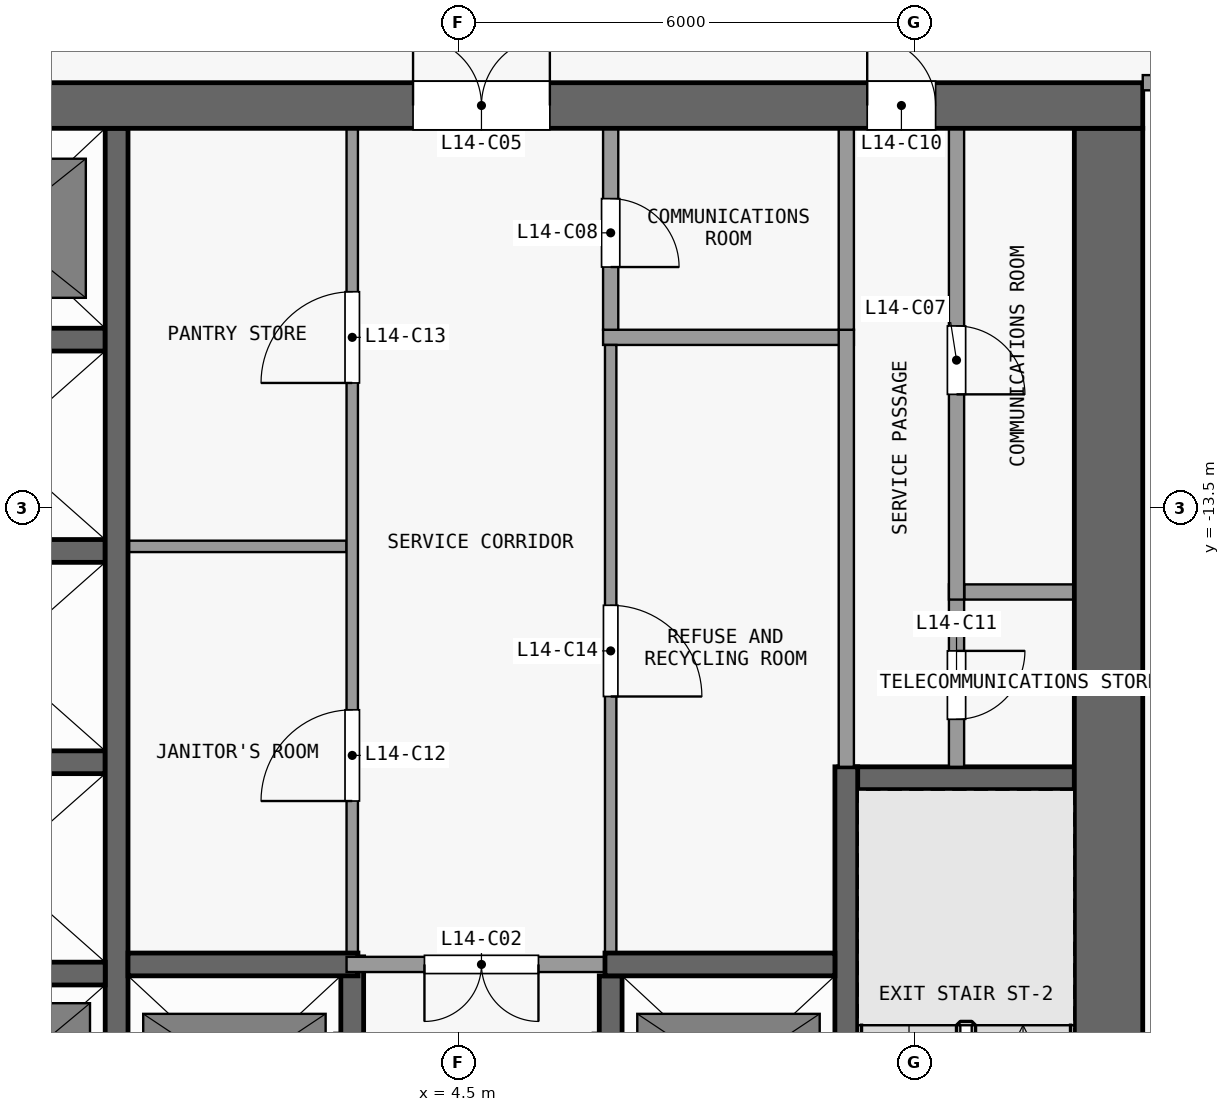
"""IFC4 building model, lengths in metres.
Left out: names, types, materials, properties, quantities, classifications, styles, units other than length and angle.
Written with IfcOpenShell. Run it as: python <this file> out.ifc"""

import sys

from ifc_helpers import new_model, si_unit, direction, frame, frame_2d, origin, place, context, subcontext, project, spatial, rectangle, extrude, element, fill, save


model = new_model("IFC4")
c1 = context("Model", 3, precision=1e-05, world=origin(), true_north=direction((0.0, 1.0)))
c2 = subcontext(c1, "Body", "Model", "MODEL_VIEW")
j1 = project(units=[si_unit("LENGTHUNIT", "METRE"), si_unit("PLANEANGLEUNIT", "RADIAN")], contexts=[c1])
p1 = place(None, origin())
s1 = spatial("IfcSite", under=j1, at=p1, CompositionType="ELEMENT")
p2 = place(p1, origin())
s2 = spatial("IfcBuilding", under=s1, at=p2, CompositionType="ELEMENT")
p3 = place(p2, frame((0.0, 0.0, 61.3)))
s3 = spatial("IfcBuildingStorey", under=s2, at=p3, CompositionType="ELEMENT", Elevation=61.3)
p4 = place(p3, frame((-13.5, -8.2, 0.0), z_axis=(0.0, 0.0, 1.0), x_axis=(1.0, 0.0, 0.0)))
e1 = element("IfcWall", 1, at=p4, inside=s3, PredefinedType="SHEAR", context=c2, shape_type="SweptSolid", body=[
    extrude(rectangle(XDim=27.0, YDim=0.6, at=frame_2d((13.5, 0.0))), origin(), (0.0, 0.0, 1.0), 3.3),
])
p5 = place(p4, frame((7.8, 0.0, 0.0)))
e2 = element("IfcOpeningElement", 2, at=p5, cuts=e1, PredefinedType="OPENING", context=c2, shape_type="SweptSolid", body=[
    extrude(rectangle(XDim=1.8, YDim=2.1, at=frame_2d((0.9, 1.05))), frame((0.0, 0.31, 0.0), z_axis=(0.0, -1.0, 0.0), x_axis=(1.0, 0.0, 0.0)), (0.0, 0.0, 1.0), 0.62),
])
p6 = place(p4, frame((17.4, 0.0, 0.0)))
e3 = element("IfcOpeningElement", 3, at=p6, cuts=e1, PredefinedType="OPENING", context=c2, shape_type="SweptSolid", body=[
    extrude(rectangle(XDim=1.8, YDim=2.1, at=frame_2d((0.9, 1.05))), frame((0.0, 0.31, 0.0), z_axis=(0.0, -1.0, 0.0), x_axis=(1.0, 0.0, 0.0)), (0.0, 0.0, 1.0), 0.62),
])
p7 = place(p4, frame((1.725, 0.0, 0.0)))
e4 = element("IfcOpeningElement", 4, at=p7, cuts=e1, PredefinedType="OPENING", context=c2, shape_type="SweptSolid", body=[
    extrude(rectangle(XDim=1.2, YDim=2.1, at=frame_2d((0.6, 1.05))), frame((0.0, 0.31, 0.0), z_axis=(0.0, -1.0, 0.0), x_axis=(1.0, 0.0, 0.0)), (0.0, 0.0, 1.0), 0.62),
])
p8 = place(p4, frame((23.375, 0.0, 0.0)))
e5 = element("IfcOpeningElement", 5, at=p8, cuts=e1, PredefinedType="OPENING", context=c2, shape_type="SweptSolid", body=[
    extrude(rectangle(XDim=0.9, YDim=2.1, at=frame_2d((0.45, 1.05))), frame((0.0, 0.31, 0.0), z_axis=(0.0, -1.0, 0.0), x_axis=(1.0, 0.0, 0.0)), (0.0, 0.0, 1.0), 0.62),
])
p9 = place(p3, frame((13.05, -24.6, 0.0), z_axis=(0.0, 0.0, 1.0), x_axis=(0.0, 1.0, 0.0)))
e6 = element("IfcWall", 6, at=p9, inside=s3, PredefinedType="SHEAR", context=c2, shape_type="SweptSolid", body=[
    extrude(rectangle(XDim=16.1, YDim=0.9, at=frame_2d((8.05, 0.0))), origin(), (0.0, 0.0, 1.0), 3.3),
])
p10 = place(p3, frame((-2.95, -19.62, 0.0), z_axis=(0.0, 0.0, 1.0), x_axis=(1.0, 0.0, 0.0)))
e7 = element("IfcWall", 7, at=p10, inside=s3, PredefinedType="SHEAR", context=c2, shape_type="SweptSolid", body=[
    extrude(rectangle(XDim=2.8, YDim=0.3, at=frame_2d((1.4, 0.0))), origin(), (0.0, 0.0, 1.0), 3.3),
])
p11 = place(p3, frame((0.15, -19.5, 0.0), z_axis=(0.0, 0.0, 1.0), x_axis=(1.0, 0.0, 0.0)))
e8 = element("IfcWall", 8, at=p11, inside=s3, PredefinedType="SHEAR", context=c2, shape_type="SweptSolid", body=[
    extrude(rectangle(XDim=3.025, YDim=0.3, at=frame_2d((1.513, 0.0))), origin(), (0.0, 0.0, 1.0), 3.3),
])
p12 = place(p3, frame((6.575, -19.5, 0.0), z_axis=(0.0, 0.0, 1.0), x_axis=(-1.0, 0.0, 0.0)))
e9 = element("IfcWall", 9, at=p12, inside=s3, PredefinedType="PARTITIONING", context=c2, shape_type="SweptSolid", body=[
    extrude(rectangle(XDim=3.55, YDim=0.2, at=frame_2d((1.775, 0.0))), origin(), (0.0, 0.0, 1.0), 3.3),
])
p13 = place(p12, frame((1.025, 0.0, 0.0)))
e10 = element("IfcOpeningElement", 10, at=p13, cuts=e9, PredefinedType="OPENING", context=c2, shape_type="SweptSolid", body=[
    extrude(rectangle(XDim=1.5, YDim=2.1, at=frame_2d((0.75, 1.05))), frame((0.0, 0.11, 0.0), z_axis=(0.0, -1.0, 0.0), x_axis=(1.0, 0.0, 0.0)), (0.0, 0.0, 1.0), 0.22),
])
p14 = place(p3, frame((6.425, -19.5, 0.0), z_axis=(0.0, 0.0, 1.0), x_axis=(1.0, 0.0, 0.0)))
e11 = element("IfcWall", 11, at=p14, inside=s3, PredefinedType="SHEAR", context=c2, shape_type="SweptSolid", body=[
    extrude(rectangle(XDim=3.025, YDim=0.3, at=frame_2d((1.512, 0.0))), origin(), (0.0, 0.0, 1.0), 3.3),
])
p15 = place(p3, frame((9.5, -17.05, 0.0), z_axis=(0.0, 0.0, 1.0), x_axis=(1.0, 0.0, 0.0)))
e12 = element("IfcWall", 12, at=p15, inside=s3, PredefinedType="SHEAR", context=c2, shape_type="SweptSolid", body=[
    extrude(rectangle(XDim=3.1, YDim=0.3, at=frame_2d((1.55, 0.0))), origin(), (0.0, 0.0, 1.0), 3.3),
])
p16 = place(p3, frame((-2.95, -16.84, 0.0), z_axis=(0.0, 0.0, 1.0), x_axis=(1.0, 0.0, 0.0)))
e13 = element("IfcWall", 13, at=p16, inside=s3, PredefinedType="SHEAR", context=c2, shape_type="SweptSolid", body=[
    extrude(rectangle(XDim=2.8, YDim=0.3, at=frame_2d((1.4, 0.0))), origin(), (0.0, 0.0, 1.0), 3.3),
])
p17 = place(p3, frame((11.15, -14.6, 0.0), z_axis=(0.0, 0.0, 1.0), x_axis=(1.0, 0.0, 0.0)))
e14 = element("IfcWall", 14, at=p17, inside=s3, PredefinedType="PARTITIONING", context=c2, shape_type="SweptSolid", body=[
    extrude(rectangle(XDim=1.45, YDim=0.2, at=frame_2d((0.725, 0.0))), origin(), (0.0, 0.0, 1.0), 3.3),
])
p18 = place(p3, frame((-2.95, -14.06, 0.0), z_axis=(0.0, 0.0, 1.0), x_axis=(1.0, 0.0, 0.0)))
e15 = element("IfcWall", 15, at=p18, inside=s3, PredefinedType="SHEAR", context=c2, shape_type="SweptSolid", body=[
    extrude(rectangle(XDim=2.8, YDim=0.3, at=frame_2d((1.4, 0.0))), origin(), (0.0, 0.0, 1.0), 3.3),
])
p19 = place(p3, frame((0.15, -14.0, 0.0), z_axis=(0.0, 0.0, 1.0), x_axis=(1.0, 0.0, 0.0)))
e16 = element("IfcWall", 16, at=p19, inside=s3, PredefinedType="PARTITIONING", context=c2, shape_type="SweptSolid", body=[
    extrude(rectangle(XDim=2.875, YDim=0.15, at=frame_2d((1.438, 0.0))), origin(), (0.0, 0.0, 1.0), 3.3),
])
p20 = place(p3, frame((-2.95, -11.28, 0.0), z_axis=(0.0, 0.0, 1.0), x_axis=(1.0, 0.0, 0.0)))
e17 = element("IfcWall", 17, at=p20, inside=s3, PredefinedType="SHEAR", context=c2, shape_type="SweptSolid", body=[
    extrude(rectangle(XDim=2.8, YDim=0.3, at=frame_2d((1.4, 0.0))), origin(), (0.0, 0.0, 1.0), 3.3),
])
p21 = place(p3, frame((6.4, -11.25, 0.0), z_axis=(0.0, 0.0, 1.0), x_axis=(1.0, 0.0, 0.0)))
e18 = element("IfcWall", 18, at=p21, inside=s3, PredefinedType="PARTITIONING", context=c2, shape_type="SweptSolid", body=[
    extrude(rectangle(XDim=3.3, YDim=0.2, at=frame_2d((1.65, 0.0))), origin(), (0.0, 0.0, 1.0), 3.3),
])
p22 = place(p3, frame((0.0, -22.25, 0.0), z_axis=(0.0, 0.0, 1.0), x_axis=(0.0, 1.0, 0.0)))
e19 = element("IfcWall", 19, at=p22, inside=s3, PredefinedType="SHEAR", context=c2, shape_type="SweptSolid", body=[
    extrude(rectangle(XDim=13.75, YDim=0.3, at=frame_2d((6.875, 0.0))), origin(), (0.0, 0.0, 1.0), 3.3),
])
p23 = place(p3, frame((3.1, -22.25, 0.0), z_axis=(0.0, 0.0, 1.0), x_axis=(0.0, 1.0, 0.0)))
e20 = element("IfcWall", 20, at=p23, inside=s3, PredefinedType="SHEAR", context=c2, shape_type="SweptSolid", body=[
    extrude(rectangle(XDim=2.85, YDim=0.3, at=frame_2d((1.425, 0.0))), origin(), (0.0, 0.0, 1.0), 3.3),
])
p24 = place(p23, frame((0.75, 0.0, 0.0)))
e21 = element("IfcOpeningElement", 21, at=p24, cuts=e20, PredefinedType="OPENING", context=c2, shape_type="SweptSolid", body=[
    extrude(rectangle(XDim=1.1, YDim=2.1, at=frame_2d((0.55, 1.05))), frame((0.0, 0.16, 0.0), z_axis=(0.0, -1.0, 0.0), x_axis=(1.0, 0.0, 0.0)), (0.0, 0.0, 1.0), 0.32),
])
p25 = place(p3, frame((3.1, -19.4, 0.0), z_axis=(0.0, 0.0, 1.0), x_axis=(0.0, 1.0, 0.0)))
e22 = element("IfcWall", 22, at=p25, inside=s3, PredefinedType="PARTITIONING", context=c2, shape_type="SweptSolid", body=[
    extrude(rectangle(XDim=10.9, YDim=0.15, at=frame_2d((5.45, 0.0))), origin(), (0.0, 0.0, 1.0), 3.3),
])
p26 = place(p25, frame((2.05, 0.0, 0.0)))
e23 = element("IfcOpeningElement", 23, at=p26, cuts=e22, PredefinedType="OPENING", context=c2, shape_type="SweptSolid", body=[
    extrude(rectangle(XDim=1.2, YDim=2.1, at=frame_2d((0.6, 1.05))), frame((0.0, 0.085, 0.0), z_axis=(0.0, -1.0, 0.0), x_axis=(1.0, 0.0, 0.0)), (0.0, 0.0, 1.0), 0.17),
])
p27 = place(p25, frame((7.55, 0.0, 0.0)))
e24 = element("IfcOpeningElement", 24, at=p27, cuts=e22, PredefinedType="OPENING", context=c2, shape_type="SweptSolid", body=[
    extrude(rectangle(XDim=1.2, YDim=2.1, at=frame_2d((0.6, 1.05))), frame((0.0, 0.085, 0.0), z_axis=(0.0, -1.0, 0.0), x_axis=(1.0, 0.0, 0.0)), (0.0, 0.0, 1.0), 0.17),
])
p28 = place(p3, frame((6.5, -22.25, 0.0), z_axis=(0.0, 0.0, 1.0), x_axis=(0.0, 1.0, 0.0)))
e25 = element("IfcWall", 25, at=p28, inside=s3, PredefinedType="SHEAR", context=c2, shape_type="SweptSolid", body=[
    extrude(rectangle(XDim=2.6, YDim=0.3, at=frame_2d((1.3, 0.0))), origin(), (0.0, 0.0, 1.0), 3.3),
])
p29 = place(p28, frame((0.75, 0.0, 0.0)))
e26 = element("IfcOpeningElement", 26, at=p29, cuts=e25, PredefinedType="OPENING", context=c2, shape_type="SweptSolid", body=[
    extrude(rectangle(XDim=1.1, YDim=2.1, at=frame_2d((0.55, 1.05))), frame((0.0, 0.16, 0.0), z_axis=(0.0, -1.0, 0.0), x_axis=(1.0, 0.0, 0.0)), (0.0, 0.0, 1.0), 0.32),
])
p30 = place(p3, frame((6.5, -11.35, 0.0), z_axis=(0.0, 0.0, 1.0), x_axis=(0.0, -1.0, 0.0)))
e27 = element("IfcWall", 27, at=p30, inside=s3, PredefinedType="PARTITIONING", context=c2, shape_type="SweptSolid", body=[
    extrude(rectangle(XDim=8.0, YDim=0.15, at=frame_2d((4.0, 0.0))), origin(), (0.0, 0.0, 1.0), 3.3),
])
p31 = place(p30, frame((3.425, 0.0, 0.0)))
e28 = element("IfcOpeningElement", 28, at=p31, cuts=e27, PredefinedType="OPENING", context=c2, shape_type="SweptSolid", body=[
    extrude(rectangle(XDim=1.2, YDim=2.1, at=frame_2d((0.6, 1.05))), frame((0.0, 0.085, 0.0), z_axis=(0.0, -1.0, 0.0), x_axis=(1.0, 0.0, 0.0)), (0.0, 0.0, 1.0), 0.17),
])
p32 = place(p3, frame((6.5, -8.5, 0.0), z_axis=(0.0, 0.0, 1.0), x_axis=(0.0, -1.0, 0.0)))
e29 = element("IfcWall", 29, at=p32, inside=s3, PredefinedType="PARTITIONING", context=c2, shape_type="SweptSolid", body=[
    extrude(rectangle(XDim=2.65, YDim=0.2, at=frame_2d((1.325, 0.0))), origin(), (0.0, 0.0, 1.0), 3.3),
])
p33 = place(p32, frame((0.925, 0.0, 0.0)))
e30 = element("IfcOpeningElement", 30, at=p33, cuts=e29, PredefinedType="OPENING", context=c2, shape_type="SweptSolid", body=[
    extrude(rectangle(XDim=0.9, YDim=2.1, at=frame_2d((0.45, 1.05))), frame((0.0, 0.11, 0.0), z_axis=(0.0, -1.0, 0.0), x_axis=(1.0, 0.0, 0.0)), (0.0, 0.0, 1.0), 0.22),
])
p34 = place(p3, frame((9.6, -16.9, 0.0), z_axis=(0.0, 0.0, 1.0), x_axis=(0.0, -1.0, 0.0)))
e31 = element("IfcWall", 31, at=p34, inside=s3, PredefinedType="SHEAR", context=c2, shape_type="SweptSolid", body=[
    extrude(rectangle(XDim=7.7, YDim=0.3, at=frame_2d((3.85, 0.0))), origin(), (0.0, 0.0, 1.0), 3.3),
])
p35 = place(p34, frame((6.5, 0.0, 0.0)))
e32 = element("IfcOpeningElement", 32, at=p35, cuts=e31, PredefinedType="OPENING", context=c2, shape_type="SweptSolid", body=[
    extrude(rectangle(XDim=1.1, YDim=2.1, at=frame_2d((0.55, 1.05))), frame((0.0, 0.16, 0.0), z_axis=(0.0, -1.0, 0.0), x_axis=(1.0, 0.0, 0.0)), (0.0, 0.0, 1.0), 0.32),
])
p36 = place(p3, frame((9.6, -16.9, 0.0), z_axis=(0.0, 0.0, 1.0), x_axis=(0.0, 1.0, 0.0)))
e33 = element("IfcWall", 33, at=p36, inside=s3, PredefinedType="PARTITIONING", context=c2, shape_type="SweptSolid", body=[
    extrude(rectangle(XDim=5.75, YDim=0.2, at=frame_2d((2.875, 0.0))), origin(), (0.0, 0.0, 1.0), 3.3),
])
p37 = place(p3, frame((9.6, -11.15, 0.0), z_axis=(0.0, 0.0, 1.0), x_axis=(0.0, 1.0, 0.0)))
e34 = element("IfcWall", 34, at=p37, inside=s3, PredefinedType="PARTITIONING", context=c2, shape_type="SweptSolid", body=[
    extrude(rectangle(XDim=2.65, YDim=0.2, at=frame_2d((1.325, 0.0))), origin(), (0.0, 0.0, 1.0), 3.3),
])
p38 = place(p3, frame((11.05, -14.5, 0.0), z_axis=(0.0, 0.0, 1.0), x_axis=(0.0, -1.0, 0.0)))
e35 = element("IfcWall", 35, at=p38, inside=s3, PredefinedType="PARTITIONING", context=c2, shape_type="SweptSolid", body=[
    extrude(rectangle(XDim=2.4, YDim=0.2, at=frame_2d((1.2, 0.0))), origin(), (0.0, 0.0, 1.0), 3.3),
])
p39 = place(p38, frame((0.875, 0.0, 0.0)))
e36 = element("IfcOpeningElement", 36, at=p39, cuts=e35, PredefinedType="OPENING", context=c2, shape_type="SweptSolid", body=[
    extrude(rectangle(XDim=0.9, YDim=2.1, at=frame_2d((0.45, 1.05))), frame((0.0, 0.11, 0.0), z_axis=(0.0, -1.0, 0.0), x_axis=(1.0, 0.0, 0.0)), (0.0, 0.0, 1.0), 0.22),
])
p40 = place(p3, frame((11.05, -8.5, 0.0), z_axis=(0.0, 0.0, 1.0), x_axis=(0.0, -1.0, 0.0)))
e37 = element("IfcWall", 37, at=p40, inside=s3, PredefinedType="PARTITIONING", context=c2, shape_type="SweptSolid", body=[
    extrude(rectangle(XDim=6.2, YDim=0.2, at=frame_2d((3.1, 0.0))), origin(), (0.0, 0.0, 1.0), 3.3),
])
p41 = place(p40, frame((2.6, 0.0, 0.0)))
e38 = element("IfcOpeningElement", 38, at=p41, cuts=e37, PredefinedType="OPENING", context=c2, shape_type="SweptSolid", body=[
    extrude(rectangle(XDim=0.9, YDim=2.1, at=frame_2d((0.45, 1.05))), frame((0.0, 0.11, 0.0), z_axis=(0.0, -1.0, 0.0), x_axis=(1.0, 0.0, 0.0)), (0.0, 0.0, 1.0), 0.22),
])
p42 = place(p3, frame((13.5, -7.9, 0.0), z_axis=(0.0, 0.0, 1.0), x_axis=(1.0, 0.0, 0.0)))
e39 = element("IfcWall", 39, at=p42, inside=s3, PredefinedType="PARTITIONING", context=c2, shape_type="SweptSolid", body=[
    extrude(rectangle(XDim=11.75, YDim=0.2, at=frame_2d((5.875, 0.0))), origin(), (0.0, 0.0, 1.0), 3.3),
])
p43 = place(p42, frame((1.0, 0.0, 0.0)))
e40 = element("IfcOpeningElement", 40, at=p43, cuts=e39, PredefinedType="OPENING", context=c2, shape_type="SweptSolid", body=[
    extrude(rectangle(XDim=1.0, YDim=2.1, at=frame_2d((0.5, 1.05))), frame((0.0, 0.11, 0.0), z_axis=(0.0, -1.0, 0.0), x_axis=(1.0, 0.0, 0.0)), (0.0, 0.0, 1.0), 0.22),
])
p44 = place(p13, origin())
e41 = element("IfcDoor", 41, at=p44, inside=s3, OperationType="DOUBLE_DOOR_SINGLE_SWING", PredefinedType="DOOR", context=c2, shape_type="SweptSolid", body=[
    extrude(rectangle(XDim=1.5, YDim=2.1, at=frame_2d((0.75, 1.05))), frame((0.0, 0.025, 0.0), z_axis=(0.0, -1.0, 0.0), x_axis=(1.0, 0.0, 0.0)), (0.0, 0.0, 1.0), 0.05),
])
fill(e10, e41)
p45 = place(p6, origin())
e42 = element("IfcDoor", 42, at=p45, inside=s3, OperationType="DOUBLE_DOOR_SINGLE_SWING", PredefinedType="DOOR", context=c2, shape_type="SweptSolid", body=[
    extrude(rectangle(XDim=1.8, YDim=2.1, at=frame_2d((0.9, 1.05))), frame((0.0, 0.025, 0.0), z_axis=(0.0, -1.0, 0.0), x_axis=(1.0, 0.0, 0.0)), (0.0, 0.0, 1.0), 0.05),
])
fill(e3, e42)
p46 = place(p41, origin())
e43 = element("IfcDoor", 43, at=p46, inside=s3, OperationType="SINGLE_SWING_RIGHT", PredefinedType="DOOR", context=c2, shape_type="SweptSolid", body=[
    extrude(rectangle(XDim=0.9, YDim=2.1, at=frame_2d((0.45, 1.05))), frame((0.0, 0.025, 0.0), z_axis=(0.0, -1.0, 0.0), x_axis=(1.0, 0.0, 0.0)), (0.0, 0.0, 1.0), 0.05),
])
fill(e38, e43)
p47 = place(p33, origin())
e44 = element("IfcDoor", 44, at=p47, inside=s3, OperationType="SINGLE_SWING_RIGHT", PredefinedType="DOOR", context=c2, shape_type="SweptSolid", body=[
    extrude(rectangle(XDim=0.9, YDim=2.1, at=frame_2d((0.45, 1.05))), frame((0.0, 0.025, 0.0), z_axis=(0.0, -1.0, 0.0), x_axis=(1.0, 0.0, 0.0)), (0.0, 0.0, 1.0), 0.05),
])
fill(e30, e44)
p48 = place(p8, origin())
e45 = element("IfcDoor", 45, at=p48, inside=s3, OperationType="SINGLE_SWING_LEFT", PredefinedType="DOOR", context=c2, shape_type="SweptSolid", body=[
    extrude(rectangle(XDim=0.9, YDim=2.1, at=frame_2d((0.45, 1.05))), frame((0.0, 0.025, 0.0), z_axis=(0.0, -1.0, 0.0), x_axis=(1.0, 0.0, 0.0)), (0.0, 0.0, 1.0), 0.05),
])
fill(e5, e45)
p49 = place(p39, origin())
e46 = element("IfcDoor", 46, at=p49, inside=s3, OperationType="SINGLE_SWING_LEFT", PredefinedType="DOOR", context=c2, shape_type="SweptSolid", body=[
    extrude(rectangle(XDim=0.9, YDim=2.1, at=frame_2d((0.45, 1.05))), frame((0.0, 0.025, 0.0), z_axis=(0.0, -1.0, 0.0), x_axis=(1.0, 0.0, 0.0)), (0.0, 0.0, 1.0), 0.05),
])
fill(e36, e46)
p50 = place(p26, origin())
e47 = element("IfcDoor", 47, at=p50, inside=s3, OperationType="SINGLE_SWING_LEFT", PredefinedType="DOOR", context=c2, shape_type="SweptSolid", body=[
    extrude(rectangle(XDim=1.2, YDim=2.1, at=frame_2d((0.6, 1.05))), frame((0.0, 0.025, 0.0), z_axis=(0.0, -1.0, 0.0), x_axis=(1.0, 0.0, 0.0)), (0.0, 0.0, 1.0), 0.05),
])
fill(e23, e47)
p51 = place(p27, origin())
e48 = element("IfcDoor", 48, at=p51, inside=s3, OperationType="SINGLE_SWING_LEFT", PredefinedType="DOOR", context=c2, shape_type="SweptSolid", body=[
    extrude(rectangle(XDim=1.2, YDim=2.1, at=frame_2d((0.6, 1.05))), frame((0.0, 0.025, 0.0), z_axis=(0.0, -1.0, 0.0), x_axis=(1.0, 0.0, 0.0)), (0.0, 0.0, 1.0), 0.05),
])
fill(e24, e48)
p52 = place(p31, origin())
e49 = element("IfcDoor", 49, at=p52, inside=s3, OperationType="SINGLE_SWING_RIGHT", PredefinedType="DOOR", context=c2, shape_type="SweptSolid", body=[
    extrude(rectangle(XDim=1.2, YDim=2.1, at=frame_2d((0.6, 1.05))), frame((0.0, 0.025, 0.0), z_axis=(0.0, -1.0, 0.0), x_axis=(1.0, 0.0, 0.0)), (0.0, 0.0, 1.0), 0.05),
])
fill(e28, e49)
save(model, sys.argv[1])
